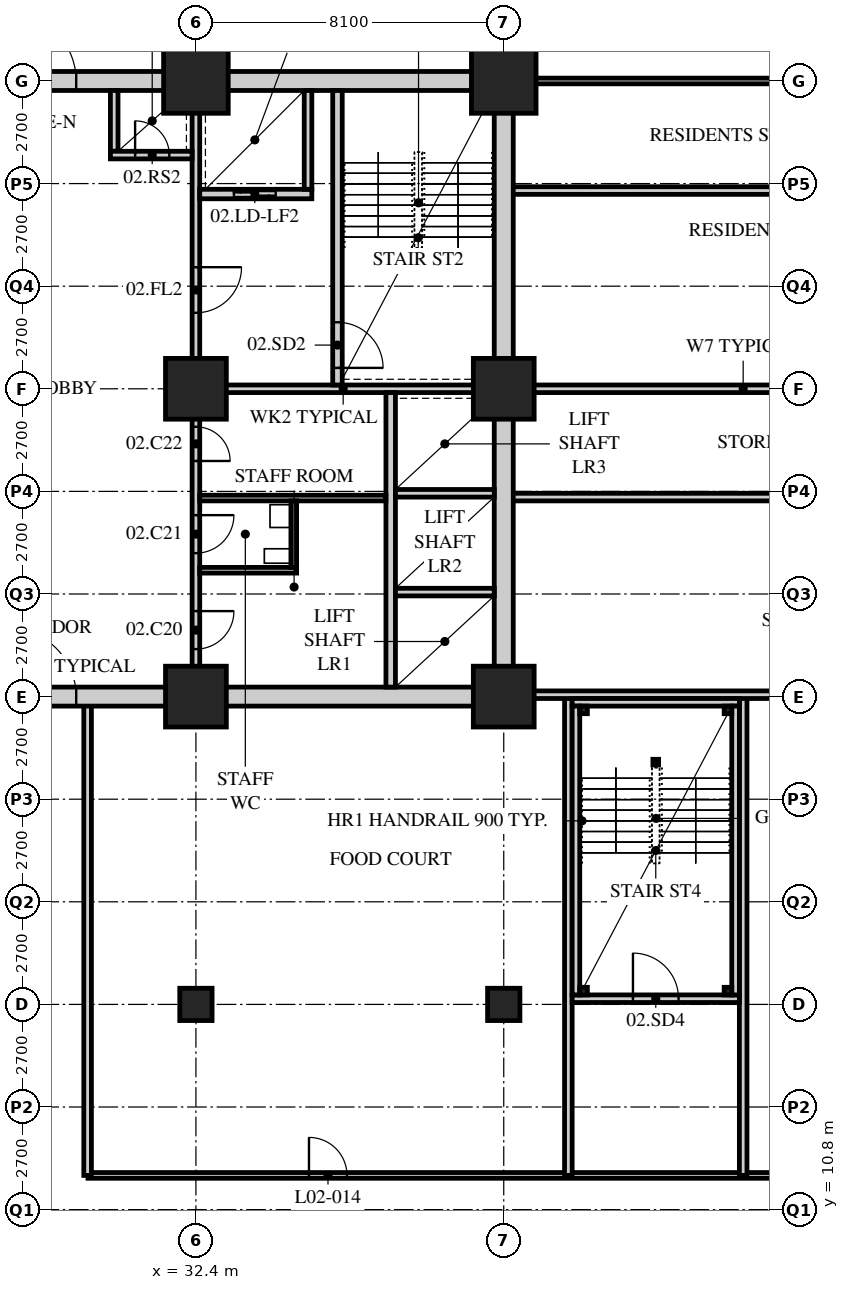
"""IFC4 building model, lengths in metres.
Left out: names, types, materials, properties, quantities, classifications, styles, units other than length and angle.
Written with IfcOpenShell. Run it as: python <this file> out.ifc"""

import sys

from ifc_helpers import new_model, si_unit, direction, frame, frame_2d, origin, origin_2d, place, context, subcontext, project, spatial, rectangle, hollow_rectangle, extrude, element, fill, save


model = new_model("IFC4")
c1 = context("Model", 3, precision=1e-05, world=origin(), true_north=direction((0.0, 1.0)))
c2 = subcontext(c1, "Body", "Model", "MODEL_VIEW")
j1 = project(units=[si_unit("LENGTHUNIT", "METRE"), si_unit("PLANEANGLEUNIT", "RADIAN")], contexts=[c1])
p1 = place(None, origin())
s1 = spatial("IfcSite", under=j1, at=p1, CompositionType="ELEMENT")
p2 = place(p1, origin())
s2 = spatial("IfcBuilding", under=s1, at=p2, CompositionType="ELEMENT")
p3 = place(p2, frame((0.0, 0.0, 11.4)))
s3 = spatial("IfcBuildingStorey", under=s2, at=p3, CompositionType="ELEMENT", Elevation=11.4)
p4 = place(p3, frame((32.4, 16.2, 0.0), z_axis=(0.0, 0.0, 1.0), x_axis=(1.0, 0.0, 0.0)))
e1 = element("IfcColumn", 1, at=p4, inside=s3, PredefinedType="COLUMN", context=c2, shape_type="SweptSolid", body=[
    extrude(hollow_rectangle(XDim=0.85, YDim=0.85, WallThickness=0.085, at=origin_2d()), origin(), (0.0, 0.0, 1.0), 5.4),
])
for number, where, z_axis, x_axis in (
    (2, (32.4, 24.3, 0.0), (0.0, 0.0, 1.0), (1.0, 0.0, 0.0)),
    (3, (32.4, 32.4, 0.0), (0.0, 0.0, 1.0), (1.0, 0.0, 0.0)),
):
    element("IfcColumn", number, at=place(p3, frame(where, z_axis=z_axis, x_axis=x_axis)), inside=s3, PredefinedType="COLUMN", context=c2, shape_type="SweptSolid", body=[
        extrude(hollow_rectangle(XDim=1.6, YDim=1.6, WallThickness=0.15, at=origin_2d()), origin(), (0.0, 0.0, 1.0), 5.4),
    ])
p5 = place(p3, frame((32.4, 40.5, 0.0), z_axis=(0.0, 0.0, 1.0), x_axis=(1.0, 0.0, 0.0)))
e4 = element("IfcColumn", 4, at=p5, inside=s3, PredefinedType="COLUMN", context=c2, shape_type="SweptSolid", body=[
    extrude(hollow_rectangle(XDim=1.7, YDim=1.7, WallThickness=0.16, at=origin_2d()), origin(), (0.0, 0.0, 1.0), 5.4),
])
p6 = place(p3, frame((40.5, 16.2, 0.0), z_axis=(0.0, 0.0, 1.0), x_axis=(1.0, 0.0, 0.0)))
e5 = element("IfcColumn", 5, at=p6, inside=s3, PredefinedType="COLUMN", context=c2, shape_type="SweptSolid", body=[
    extrude(hollow_rectangle(XDim=0.85, YDim=0.85, WallThickness=0.085, at=origin_2d()), origin(), (0.0, 0.0, 1.0), 5.4),
])
for number, where, z_axis, x_axis in (
    (6, (40.5, 24.3, 0.0), (0.0, 0.0, 1.0), (1.0, 0.0, 0.0)),
    (7, (40.5, 32.4, 0.0), (0.0, 0.0, 1.0), (1.0, 0.0, 0.0)),
):
    element("IfcColumn", number, at=place(p3, frame(where, z_axis=z_axis, x_axis=x_axis)), inside=s3, PredefinedType="COLUMN", context=c2, shape_type="SweptSolid", body=[
        extrude(hollow_rectangle(XDim=1.6, YDim=1.6, WallThickness=0.15, at=origin_2d()), origin(), (0.0, 0.0, 1.0), 5.4),
    ])
p7 = place(p3, frame((40.5, 40.5, 0.0), z_axis=(0.0, 0.0, 1.0), x_axis=(1.0, 0.0, 0.0)))
e8 = element("IfcColumn", 8, at=p7, inside=s3, PredefinedType="COLUMN", context=c2, shape_type="SweptSolid", body=[
    extrude(hollow_rectangle(XDim=1.7, YDim=1.7, WallThickness=0.16, at=origin_2d()), origin(), (0.0, 0.0, 1.0), 5.4),
])
p8 = place(p3, frame((53.1, 40.5, 0.0), z_axis=(0.0, 0.0, 1.0), x_axis=(-1.0, 0.0, 0.0)))
e9 = element("IfcWall", 9, at=p8, inside=s3, PredefinedType="PARTITIONING", context=c2, shape_type="SweptSolid", body=[
    extrude(rectangle(XDim=12.4, YDim=0.15, at=frame_2d((6.2, 0.0))), origin(), (0.0, 0.0, 1.0), 4.538),
])
p9 = place(p3, frame((29.56, 11.7, 0.0), z_axis=(0.0, 0.0, 1.0), x_axis=(1.0, 0.0, 0.0)))
e10 = element("IfcWall", 10, at=p9, inside=s3, PredefinedType="PARTITIONING", context=c2, shape_type="SweptSolid", body=[
    extrude(rectangle(XDim=23.54, YDim=0.15, at=frame_2d((11.77, 0.0))), origin(), (0.0, 0.0, 1.0), 5.15),
])
p10 = place(p9, frame((5.815, 0.0, 0.0)))
e11 = element("IfcOpeningElement", 11, at=p10, cuts=e10, PredefinedType="OPENING", context=c2, shape_type="SweptSolid", body=[
    extrude(rectangle(XDim=1.0, YDim=2.1, at=frame_2d((0.5, 1.05))), frame((0.0, 0.085, 0.0), z_axis=(0.0, -1.0, 0.0), x_axis=(1.0, 0.0, 0.0)), (0.0, 0.0, 1.0), 0.17),
])
p11 = place(p9, frame((19.89, 0.0, 0.0)))
e12 = element("IfcOpeningElement", 12, at=p11, cuts=e10, PredefinedType="OPENING", context=c2, shape_type="SweptSolid", body=[
    extrude(rectangle(XDim=1.0, YDim=2.1, at=frame_2d((0.5, 1.05))), frame((0.0, 0.085, 0.0), z_axis=(0.0, -1.0, 0.0), x_axis=(1.0, 0.0, 0.0)), (0.0, 0.0, 1.0), 0.17),
])
p12 = place(p3, frame((40.5, 32.4, 0.0), z_axis=(0.0, 0.0, 1.0), x_axis=(1.0, 0.0, 0.0)))
e13 = element("IfcWall", 13, at=p12, inside=s3, PredefinedType="SOLIDWALL", context=c2, shape_type="SweptSolid", body=[
    extrude(rectangle(XDim=12.6, YDim=0.2, at=frame_2d((6.3, 0.0))), origin(), (0.0, 0.0, 1.0), 4.538),
])
for number, where, z_axis, x_axis in (
    (14, (53.1, 29.55, 0.0), (0.0, 0.0, 1.0), (-1.0, 0.0, 0.0)),
    (15, (53.1, 37.617, 0.0), (0.0, 0.0, 1.0), (-1.0, 0.0, 0.0)),
    (16, (42.2, 11.7, 0.0), (0.0, 0.0, 1.0), (0.0, 1.0, 0.0)),
    (17, (46.8, 11.7, 0.0), (0.0, 0.0, 1.0), (0.0, 1.0, 0.0)),
    (18, (29.55, 11.7, 0.0), (0.0, 0.0, 1.0), (0.0, 1.0, 0.0)),
):
    element("IfcWall", number, at=place(p3, frame(where, z_axis=z_axis, x_axis=x_axis)), inside=s3, PredefinedType="SOLIDWALL", context=c2, shape_type="SweptSolid", body=[
        extrude(rectangle(XDim=12.6, YDim=0.2, at=frame_2d((6.3, 0.0))), origin(), (0.0, 0.0, 1.0), 5.15),
    ])
p13 = place(p3, frame((40.5, 24.35, 0.0), z_axis=(0.0, 0.0, 1.0), x_axis=(1.0, 0.0, 0.0)))
e19 = element("IfcWall", 19, at=p13, inside=s3, PredefinedType="SOLIDWALL", context=c2, shape_type="SweptSolid", body=[
    extrude(rectangle(XDim=12.6, YDim=0.2, at=frame_2d((6.3, 0.0))), origin(), (0.0, 0.0, 1.0), 4.538),
])
p14 = place(p3, frame((15.95, 24.3, 0.0), z_axis=(0.0, 0.0, 1.0), x_axis=(1.0, 0.0, 0.0)))
e20 = element("IfcWall", 20, at=p14, inside=s3, PredefinedType="SOLIDWALL", context=c2, shape_type="SweptSolid", body=[
    extrude(rectangle(XDim=24.8, YDim=0.5, at=frame_2d((12.4, 0.0))), origin(), (0.0, 0.0, 1.0), 4.5),
])
p15 = place(p14, frame((11.5, 0.0, 0.0)))
e21 = element("IfcOpeningElement", 21, at=p15, cuts=e20, PredefinedType="OPENING", context=c2, shape_type="SweptSolid", body=[
    extrude(rectangle(XDim=1.8, YDim=2.4, at=frame_2d((0.9, 1.2))), frame((0.0, 0.26, 0.0), z_axis=(0.0, -1.0, 0.0), x_axis=(1.0, 0.0, 0.0)), (0.0, 0.0, 1.0), 0.52),
])
p16 = place(p3, frame((15.95, 40.5, 0.0), z_axis=(0.0, 0.0, 1.0), x_axis=(1.0, 0.0, 0.0)))
e22 = element("IfcWall", 22, at=p16, inside=s3, PredefinedType="SOLIDWALL", context=c2, shape_type="SweptSolid", body=[
    extrude(rectangle(XDim=24.8, YDim=0.5, at=frame_2d((12.4, 0.0))), origin(), (0.0, 0.0, 1.0), 4.5),
])
p17 = place(p16, frame((11.5, 0.0, 0.0)))
e23 = element("IfcOpeningElement", 23, at=p17, cuts=e22, PredefinedType="OPENING", context=c2, shape_type="SweptSolid", body=[
    extrude(rectangle(XDim=1.8, YDim=2.4, at=frame_2d((0.9, 1.2))), frame((0.0, 0.26, 0.0), z_axis=(0.0, -1.0, 0.0), x_axis=(1.0, 0.0, 0.0)), (0.0, 0.0, 1.0), 0.52),
])
p18 = place(p3, frame((40.5, 24.55, 0.0), z_axis=(0.0, 0.0, 1.0), x_axis=(0.0, 1.0, 0.0)))
e24 = element("IfcWall", 24, at=p18, inside=s3, PredefinedType="SOLIDWALL", context=c2, shape_type="SweptSolid", body=[
    extrude(rectangle(XDim=15.7, YDim=0.5, at=frame_2d((7.85, 0.0))), origin(), (0.0, 0.0, 1.0), 4.538),
])
p19 = place(p3, frame((32.3, 32.4, 0.0), z_axis=(0.0, 0.0, 1.0), x_axis=(1.0, 0.0, 0.0)))
e25 = element("IfcWall", 25, at=p19, inside=s3, PredefinedType="SOLIDWALL", context=c2, shape_type="SweptSolid", body=[
    extrude(rectangle(XDim=7.95, YDim=0.2, at=frame_2d((3.975, 0.0))), origin(), (0.0, 0.0, 1.0), 4.45),
])
p20 = place(p3, frame((32.4, 32.5, 0.0), z_axis=(0.0, 0.0, 1.0), x_axis=(0.0, 1.0, 0.0)))
e26 = element("IfcWall", 26, at=p20, inside=s3, PredefinedType="SOLIDWALL", context=c2, shape_type="SweptSolid", body=[
    extrude(rectangle(XDim=7.75, YDim=0.2, at=frame_2d((3.875, 0.0))), origin(), (0.0, 0.0, 1.0), 4.45),
])
p21 = place(p20, frame((1.9, 0.0, 0.0)))
e27 = element("IfcOpeningElement", 27, at=p21, cuts=e26, PredefinedType="OPENING", context=c2, shape_type="SweptSolid", body=[
    extrude(rectangle(XDim=1.2, YDim=2.1, at=frame_2d((0.6, 1.05))), frame((0.0, 0.11, 0.0), z_axis=(0.0, -1.0, 0.0), x_axis=(1.0, 0.0, 0.0)), (0.0, 0.0, 1.0), 0.22),
])
p22 = place(p3, frame((37.525, 24.55, 0.0), z_axis=(0.0, 0.0, 1.0), x_axis=(0.0, 1.0, 0.0)))
e28 = element("IfcWall", 28, at=p22, inside=s3, PredefinedType="SOLIDWALL", context=c2, shape_type="SweptSolid", body=[
    extrude(rectangle(XDim=7.75, YDim=0.25, at=frame_2d((3.875, 0.0))), origin(), (0.0, 0.0, 1.0), 5.15),
])
for number, where, z_axis, x_axis in (
    (29, (37.65, 27.05, 0.0), (0.0, 0.0, 1.0), (1.0, 0.0, 0.0)),
    (30, (37.65, 29.65, 0.0), (0.0, 0.0, 1.0), (1.0, 0.0, 0.0)),
):
    element("IfcWall", number, at=place(p3, frame(where, z_axis=z_axis, x_axis=x_axis)), inside=s3, PredefinedType="SOLIDWALL", context=c2, shape_type="SweptSolid", body=[
        extrude(rectangle(XDim=2.6, YDim=0.2, at=frame_2d((1.3, 0.0))), origin(), (0.0, 0.0, 1.0), 5.15),
    ])
p23 = place(p3, frame((36.125, 32.5, 0.0), z_axis=(0.0, 0.0, 1.0), x_axis=(0.0, 1.0, 0.0)))
e31 = element("IfcWall", 31, at=p23, inside=s3, PredefinedType="SOLIDWALL", context=c2, shape_type="SweptSolid", body=[
    extrude(rectangle(XDim=7.75, YDim=0.25, at=frame_2d((3.875, 0.0))), origin(), (0.0, 0.0, 1.0), 5.15),
])
p24 = place(p23, frame((0.45, 0.0, 0.0)))
e32 = element("IfcOpeningElement", 32, at=p24, cuts=e31, PredefinedType="OPENING", context=c2, shape_type="SweptSolid", body=[
    extrude(rectangle(XDim=1.2, YDim=2.1, at=frame_2d((0.6, 1.05))), frame((0.0, 0.135, 0.0), z_axis=(0.0, -1.0, 0.0), x_axis=(1.0, 0.0, 0.0)), (0.0, 0.0, 1.0), 0.27),
])
p25 = place(p3, frame((32.5, 37.525, 0.0), z_axis=(0.0, 0.0, 1.0), x_axis=(1.0, 0.0, 0.0)))
e33 = element("IfcWall", 33, at=p25, inside=s3, PredefinedType="SOLIDWALL", context=c2, shape_type="SweptSolid", body=[
    extrude(rectangle(XDim=2.95, YDim=0.25, at=frame_2d((1.475, 0.0))), origin(), (0.0, 0.0, 1.0), 5.15),
])
p26 = place(p25, frame((0.9, 0.0, 0.0)))
e34 = element("IfcOpeningElement", 34, at=p26, cuts=e33, PredefinedType="OPENING", context=c2, shape_type="SweptSolid", body=[
    extrude(rectangle(XDim=1.1, YDim=2.4, at=frame_2d((0.55, 1.2))), frame((0.0, 0.135, 0.0), z_axis=(0.0, -1.0, 0.0), x_axis=(1.0, 0.0, 0.0)), (0.0, 0.0, 1.0), 0.27),
])
p27 = place(p3, frame((35.35, 37.65, 0.0), z_axis=(0.0, 0.0, 1.0), x_axis=(0.0, 1.0, 0.0)))
e35 = element("IfcWall", 35, at=p27, inside=s3, PredefinedType="SOLIDWALL", context=c2, shape_type="SweptSolid", body=[
    extrude(rectangle(XDim=2.6, YDim=0.2, at=frame_2d((1.3, 0.0))), origin(), (0.0, 0.0, 1.0), 5.15),
])
p28 = place(p3, frame((30.25, 38.65, 0.0), z_axis=(0.0, 0.0, 1.0), x_axis=(0.0, 1.0, 0.0)))
e36 = element("IfcWall", 36, at=p28, inside=s3, PredefinedType="SOLIDWALL", context=c2, shape_type="SweptSolid", body=[
    extrude(rectangle(XDim=1.6, YDim=0.2, at=frame_2d((0.8, 0.0))), origin(), (0.0, 0.0, 1.0), 5.15),
])
p29 = place(p3, frame((30.15, 38.55, 0.0), z_axis=(0.0, 0.0, 1.0), x_axis=(1.0, 0.0, 0.0)))
e37 = element("IfcWall", 37, at=p29, inside=s3, PredefinedType="SOLIDWALL", context=c2, shape_type="SweptSolid", body=[
    extrude(rectangle(XDim=2.15, YDim=0.2, at=frame_2d((1.075, 0.0))), origin(), (0.0, 0.0, 1.0), 5.15),
])
p30 = place(p29, frame((0.65, 0.0, 0.0)))
e38 = element("IfcOpeningElement", 38, at=p30, cuts=e37, PredefinedType="OPENING", context=c2, shape_type="SweptSolid", body=[
    extrude(rectangle(XDim=0.9, YDim=2.1, at=frame_2d((0.45, 1.05))), frame((0.0, 0.11, 0.0), z_axis=(0.0, -1.0, 0.0), x_axis=(1.0, 0.0, 0.0)), (0.0, 0.0, 1.0), 0.22),
])
p31 = place(p3, frame((32.4, 24.55, 0.0), z_axis=(0.0, 0.0, 1.0), x_axis=(0.0, 1.0, 0.0)))
e39 = element("IfcWall", 39, at=p31, inside=s3, PredefinedType="PARTITIONING", context=c2, shape_type="SweptSolid", body=[
    extrude(rectangle(XDim=7.75, YDim=0.2, at=frame_2d((3.875, 0.0))), origin(), (0.0, 0.0, 1.0), 4.45),
])
p32 = place(p31, frame((1.0, 0.0, 0.0)))
e40 = element("IfcOpeningElement", 40, at=p32, cuts=e39, PredefinedType="OPENING", context=c2, shape_type="SweptSolid", body=[
    extrude(rectangle(XDim=1.0, YDim=2.1, at=frame_2d((0.5, 1.05))), frame((0.0, 0.11, 0.0), z_axis=(0.0, -1.0, 0.0), x_axis=(1.0, 0.0, 0.0)), (0.0, 0.0, 1.0), 0.22),
])
p33 = place(p31, frame((3.525, 0.0, 0.0)))
e41 = element("IfcOpeningElement", 41, at=p33, cuts=e39, PredefinedType="OPENING", context=c2, shape_type="SweptSolid", body=[
    extrude(rectangle(XDim=1.0, YDim=2.1, at=frame_2d((0.5, 1.05))), frame((0.0, 0.11, 0.0), z_axis=(0.0, -1.0, 0.0), x_axis=(1.0, 0.0, 0.0)), (0.0, 0.0, 1.0), 0.22),
])
p34 = place(p31, frame((5.95, 0.0, 0.0)))
e42 = element("IfcOpeningElement", 42, at=p34, cuts=e39, PredefinedType="OPENING", context=c2, shape_type="SweptSolid", body=[
    extrude(rectangle(XDim=0.9, YDim=2.1, at=frame_2d((0.45, 1.05))), frame((0.0, 0.11, 0.0), z_axis=(0.0, -1.0, 0.0), x_axis=(1.0, 0.0, 0.0)), (0.0, 0.0, 1.0), 0.22),
])
p35 = place(p3, frame((32.5, 27.625, 0.0), z_axis=(0.0, 0.0, 1.0), x_axis=(1.0, 0.0, 0.0)))
e43 = element("IfcWall", 43, at=p35, inside=s3, PredefinedType="PARTITIONING", context=c2, shape_type="SweptSolid", body=[
    extrude(rectangle(XDim=2.55, YDim=0.15, at=frame_2d((1.275, 0.0))), origin(), (0.0, 0.0, 1.0), 5.15),
])
p36 = place(p3, frame((32.5, 29.525, 0.0), z_axis=(0.0, 0.0, 1.0), x_axis=(1.0, 0.0, 0.0)))
e44 = element("IfcWall", 44, at=p36, inside=s3, PredefinedType="PARTITIONING", context=c2, shape_type="SweptSolid", body=[
    extrude(rectangle(XDim=4.9, YDim=0.15, at=frame_2d((2.45, 0.0))), origin(), (0.0, 0.0, 1.0), 5.15),
])
p37 = place(p3, frame((34.975, 27.7, 0.0), z_axis=(0.0, 0.0, 1.0), x_axis=(0.0, 1.0, 0.0)))
e45 = element("IfcWall", 45, at=p37, inside=s3, PredefinedType="PARTITIONING", context=c2, shape_type="SweptSolid", body=[
    extrude(rectangle(XDim=1.75, YDim=0.15, at=frame_2d((0.875, 0.0))), origin(), (0.0, 0.0, 1.0), 5.15),
])
p38 = place(p3, frame((42.3, 16.35, 0.0), z_axis=(0.0, 0.0, 1.0), x_axis=(1.0, 0.0, 0.0)))
e46 = element("IfcWall", 46, at=p38, inside=s3, PredefinedType="SOLIDWALL", context=c2, shape_type="SweptSolid", body=[
    extrude(rectangle(XDim=4.4, YDim=0.2, at=frame_2d((2.2, 0.0))), origin(), (0.0, 0.0, 1.0), 4.538),
])
p39 = place(p38, frame((1.6, 0.0, 0.0)))
e47 = element("IfcOpeningElement", 47, at=p39, cuts=e46, PredefinedType="OPENING", context=c2, shape_type="SweptSolid", body=[
    extrude(rectangle(XDim=1.2, YDim=2.1, at=frame_2d((0.6, 1.05))), frame((0.0, 0.11, 0.0), z_axis=(0.0, -1.0, 0.0), x_axis=(1.0, 0.0, 0.0)), (0.0, 0.0, 1.0), 0.22),
])
p40 = place(p3, frame((42.3, 24.15, 0.0), z_axis=(0.0, 0.0, 1.0), x_axis=(1.0, 0.0, 0.0)))
e48 = element("IfcWall", 48, at=p40, inside=s3, PredefinedType="SOLIDWALL", context=c2, shape_type="SweptSolid", body=[
    extrude(rectangle(XDim=4.4, YDim=0.2, at=frame_2d((2.2, 0.0))), origin(), (0.0, 0.0, 1.0), 4.538),
])
for number, where, z_axis, x_axis in (
    (49, (42.4, 16.45, 0.0), (0.0, 0.0, 1.0), (0.0, 1.0, 0.0)),
    (50, (46.6, 16.45, 0.0), (0.0, 0.0, 1.0), (0.0, 1.0, 0.0)),
):
    element("IfcWall", number, at=place(p3, frame(where, z_axis=z_axis, x_axis=x_axis)), inside=s3, PredefinedType="SOLIDWALL", context=c2, shape_type="SweptSolid", body=[
        extrude(rectangle(XDim=7.6, YDim=0.2, at=frame_2d((3.8, 0.0))), origin(), (0.0, 0.0, 1.0), 5.15),
    ])
for number, where, z_axis, x_axis in (
    (51, (42.6, 23.95, 0.0), (0.0, 0.0, 1.0), (1.0, 0.0, 0.0)),
    (52, (46.4, 23.95, 0.0), (0.0, 0.0, 1.0), (1.0, 0.0, 0.0)),
    (53, (42.6, 16.55, 0.0), (0.0, 0.0, 1.0), (1.0, 0.0, 0.0)),
    (54, (46.4, 16.55, 0.0), (0.0, 0.0, 1.0), (1.0, 0.0, 0.0)),
):
    element("IfcColumn", number, at=place(p3, frame(where, z_axis=z_axis, x_axis=x_axis)), inside=s3, PredefinedType="COLUMN", context=c2, shape_type="SweptSolid", body=[
        extrude(hollow_rectangle(XDim=0.2, YDim=0.2, WallThickness=0.012, at=origin_2d()), origin(), (0.0, 0.0, 1.0), 5.4),
    ])
p41 = place(p3, frame((44.5, 22.575, 0.0), z_axis=(0.0, 0.0, 1.0), x_axis=(1.0, 0.0, 0.0)))
e55 = element("IfcColumn", 55, at=p41, inside=s3, PredefinedType="COLUMN", context=c2, shape_type="SweptSolid", body=[
    extrude(hollow_rectangle(XDim=0.15, YDim=0.15, WallThickness=0.01, at=origin_2d()), origin(), (0.0, 0.0, 1.0), 5.4),
])
p42 = place(p10, origin())
e56 = element("IfcDoor", 56, at=p42, inside=s3, OperationType="SINGLE_SWING_LEFT", PredefinedType="DOOR", context=c2, shape_type="SweptSolid", body=[
    extrude(rectangle(XDim=1.0, YDim=2.1, at=frame_2d((0.5, 1.05))), frame((0.0, 0.025, 0.0), z_axis=(0.0, -1.0, 0.0), x_axis=(1.0, 0.0, 0.0)), (0.0, 0.0, 1.0), 0.05),
])
fill(e11, e56)
p43 = place(p32, origin())
e57 = element("IfcDoor", 57, at=p43, inside=s3, OperationType="SINGLE_SWING_LEFT", PredefinedType="DOOR", context=c2, shape_type="SweptSolid", body=[
    extrude(rectangle(XDim=1.0, YDim=2.1, at=frame_2d((0.5, 1.05))), frame((0.0, 0.025, 0.0), z_axis=(0.0, -1.0, 0.0), x_axis=(1.0, 0.0, 0.0)), (0.0, 0.0, 1.0), 0.05),
])
fill(e40, e57)
p44 = place(p33, origin())
e58 = element("IfcDoor", 58, at=p44, inside=s3, OperationType="SINGLE_SWING_LEFT", PredefinedType="DOOR", context=c2, shape_type="SweptSolid", body=[
    extrude(rectangle(XDim=1.0, YDim=2.1, at=frame_2d((0.5, 1.05))), frame((0.0, 0.025, 0.0), z_axis=(0.0, -1.0, 0.0), x_axis=(1.0, 0.0, 0.0)), (0.0, 0.0, 1.0), 0.05),
])
fill(e41, e58)
p45 = place(p34, origin())
e59 = element("IfcDoor", 59, at=p45, inside=s3, OperationType="SINGLE_SWING_RIGHT", PredefinedType="DOOR", context=c2, shape_type="SweptSolid", body=[
    extrude(rectangle(XDim=0.9, YDim=2.1, at=frame_2d((0.45, 1.05))), frame((0.0, 0.025, 0.0), z_axis=(0.0, -1.0, 0.0), x_axis=(1.0, 0.0, 0.0)), (0.0, 0.0, 1.0), 0.05),
])
fill(e42, e59)
p46 = place(p24, origin())
e60 = element("IfcDoor", 60, at=p46, inside=s3, OperationType="SINGLE_SWING_RIGHT", PredefinedType="DOOR", context=c2, shape_type="SweptSolid", body=[
    extrude(rectangle(XDim=1.2, YDim=2.1, at=frame_2d((0.6, 1.05))), frame((0.0, 0.025, 0.0), z_axis=(0.0, -1.0, 0.0), x_axis=(1.0, 0.0, 0.0)), (0.0, 0.0, 1.0), 0.05),
])
fill(e32, e60)
p47 = place(p21, origin())
e61 = element("IfcDoor", 61, at=p47, inside=s3, OperationType="SINGLE_SWING_LEFT", PredefinedType="DOOR", context=c2, shape_type="SweptSolid", body=[
    extrude(rectangle(XDim=1.2, YDim=2.1, at=frame_2d((0.6, 1.05))), frame((0.0, 0.025, 0.0), z_axis=(0.0, -1.0, 0.0), x_axis=(1.0, 0.0, 0.0)), (0.0, 0.0, 1.0), 0.05),
])
fill(e27, e61)
p48 = place(p30, origin())
e62 = element("IfcDoor", 62, at=p48, inside=s3, OperationType="SINGLE_SWING_LEFT", PredefinedType="DOOR", context=c2, shape_type="SweptSolid", body=[
    extrude(rectangle(XDim=0.9, YDim=2.1, at=frame_2d((0.45, 1.05))), frame((0.0, 0.025, 0.0), z_axis=(0.0, -1.0, 0.0), x_axis=(1.0, 0.0, 0.0)), (0.0, 0.0, 1.0), 0.05),
])
fill(e38, e62)
p49 = place(p26, origin())
e63 = element("IfcDoor", 63, at=p49, inside=s3, OperationType="DOUBLE_DOOR_SLIDING", PredefinedType="DOOR", context=c2, shape_type="SweptSolid", body=[
    extrude(rectangle(XDim=1.1, YDim=2.4, at=frame_2d((0.55, 1.2))), frame((0.0, 0.025, 0.0), z_axis=(0.0, -1.0, 0.0), x_axis=(1.0, 0.0, 0.0)), (0.0, 0.0, 1.0), 0.05),
])
fill(e34, e63)
p50 = place(p15, origin())
e64 = element("IfcDoor", 64, at=p50, inside=s3, OperationType="DOUBLE_DOOR_SINGLE_SWING", PredefinedType="DOOR", context=c2, shape_type="SweptSolid", body=[
    extrude(rectangle(XDim=1.8, YDim=2.4, at=frame_2d((0.9, 1.2))), frame((0.0, 0.025, 0.0), z_axis=(0.0, -1.0, 0.0), x_axis=(1.0, 0.0, 0.0)), (0.0, 0.0, 1.0), 0.05),
])
fill(e21, e64)
p51 = place(p17, origin())
e65 = element("IfcDoor", 65, at=p51, inside=s3, OperationType="DOUBLE_DOOR_SINGLE_SWING", PredefinedType="DOOR", context=c2, shape_type="SweptSolid", body=[
    extrude(rectangle(XDim=1.8, YDim=2.4, at=frame_2d((0.9, 1.2))), frame((0.0, 0.025, 0.0), z_axis=(0.0, -1.0, 0.0), x_axis=(1.0, 0.0, 0.0)), (0.0, 0.0, 1.0), 0.05),
])
fill(e23, e65)
p52 = place(p39, origin())
e66 = element("IfcDoor", 66, at=p52, inside=s3, OperationType="SINGLE_SWING_LEFT", PredefinedType="DOOR", context=c2, shape_type="SweptSolid", body=[
    extrude(rectangle(XDim=1.2, YDim=2.1, at=frame_2d((0.6, 1.05))), frame((0.0, 0.025, 0.0), z_axis=(0.0, -1.0, 0.0), x_axis=(1.0, 0.0, 0.0)), (0.0, 0.0, 1.0), 0.05),
])
fill(e47, e66)
save(model, sys.argv[1])
